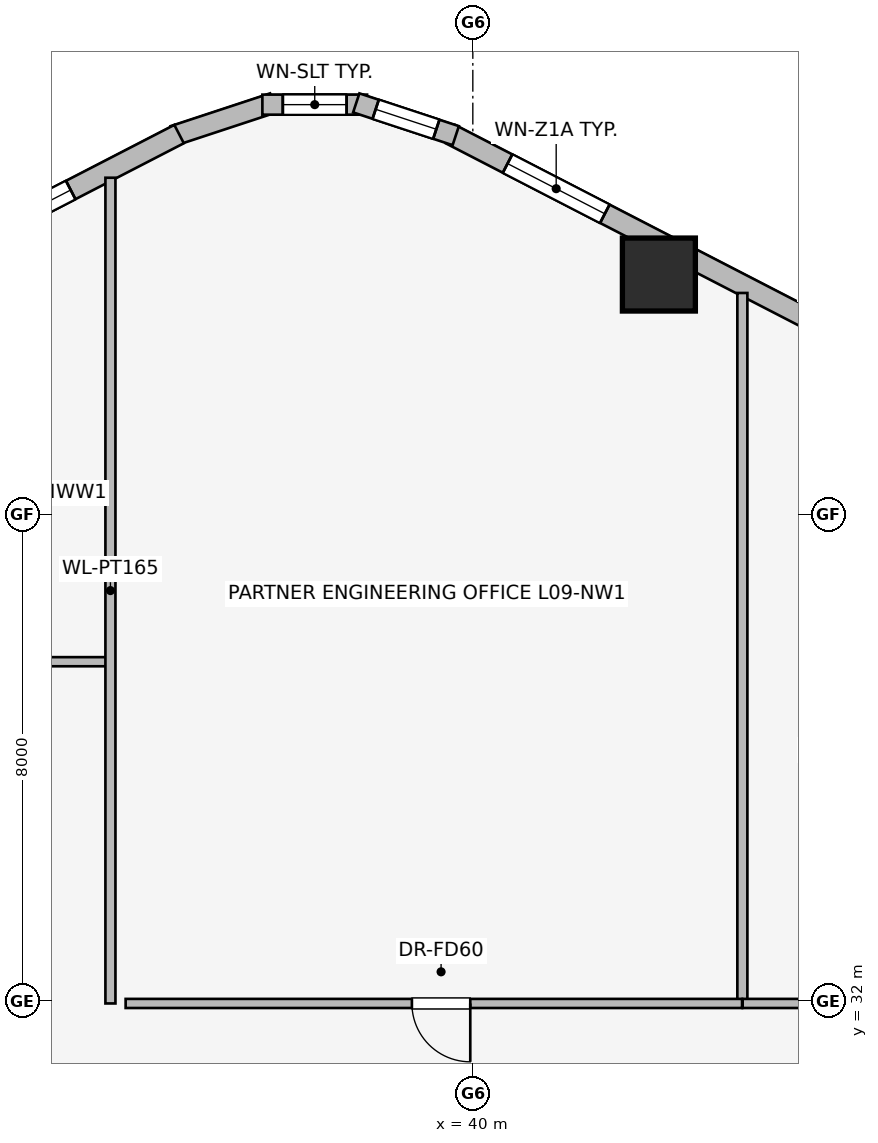
"""IFC4 building model, lengths in metres.
Left out: names, types, materials, properties, quantities, classifications, styles, units other than length and angle.
Written with IfcOpenShell. Run it as: python <this file> out.ifc"""

import sys

from ifc_helpers import new_model, si_unit, direction, frame, frame_2d, origin, origin_2d, place, context, subcontext, project, spatial, rectangle, extrude, element, fill, save


model = new_model("IFC4")
c1 = context("Model", 3, precision=1e-05, world=origin(), true_north=direction((0.0, 1.0)))
c2 = subcontext(c1, "Body", "Model", "MODEL_VIEW")
j1 = project(units=[si_unit("LENGTHUNIT", "METRE"), si_unit("PLANEANGLEUNIT", "RADIAN")], contexts=[c1])
p1 = place(None, origin())
s1 = spatial("IfcSite", under=j1, at=p1, CompositionType="ELEMENT")
p2 = place(p1, origin())
s2 = spatial("IfcBuilding", under=s1, at=p2, CompositionType="ELEMENT")
p3 = place(p2, frame((0.0, 0.0, 37.95)))
s3 = spatial("IfcBuildingStorey", under=s2, at=p3, CompositionType="ELEMENT", Elevation=37.95)
p4 = place(p3, frame((43.06, 43.947, 0.0), z_axis=(0.0, 0.0, 1.0), x_axis=(1.0, 0.0, 0.0)))
e1 = element("IfcColumn", 1, at=p4, inside=s3, PredefinedType="COLUMN", context=c2, shape_type="SweptSolid", body=[
    extrude(rectangle(XDim=1.2, YDim=1.2, at=origin_2d()), origin(), (0.0, 0.0, 1.0), 3.65),
])
p5 = place(p3, frame((39.631, 46.257, 0.0), z_axis=(0.0, 0.0, 1.0), x_axis=(0.888634413993, -0.458616264721, 0.0)))
e2 = element("IfcWall", 2, at=p5, inside=s3, PredefinedType="STANDARD", context=c2, shape_type="SweptSolid", body=[
    extrude(rectangle(XDim=20.531, YDim=0.34, at=frame_2d((10.266, 0.0))), origin(), (0.0, 0.0, 1.0), 2.684),
])
p6 = place(p5, frame((9.716, 0.0, 0.0)))
e3 = element("IfcOpeningElement", 3, at=p6, cuts=e2, PredefinedType="OPENING", context=c2, shape_type="SweptSolid", body=[
    extrude(rectangle(XDim=1.1, YDim=2.04, at=frame_2d((0.55, 1.02))), frame((0.0, 0.18, 0.0), z_axis=(0.0, -1.0, 0.0), x_axis=(1.0, 0.0, 0.0)), (0.0, 0.0, 1.0), 0.36),
])
p7 = place(p5, frame((1.058, 0.0, 0.75)))
e4 = element("IfcOpeningElement", 4, at=p7, cuts=e2, PredefinedType="OPENING", context=c2, shape_type="SweptSolid", body=[
    extrude(rectangle(XDim=1.8, YDim=1.5, at=frame_2d((0.9, 0.75))), frame((0.0, 0.18, 0.0), z_axis=(0.0, -1.0, 0.0), x_axis=(1.0, 0.0, 0.0)), (0.0, 0.0, 1.0), 0.36),
])
p8 = place(p5, frame((6.862, 0.0, 0.75)))
e5 = element("IfcOpeningElement", 5, at=p8, cuts=e2, PredefinedType="OPENING", context=c2, shape_type="SweptSolid", body=[
    extrude(rectangle(XDim=1.5, YDim=1.5, at=frame_2d((0.75, 0.75))), frame((0.0, 0.18, 0.0), z_axis=(0.0, -1.0, 0.0), x_axis=(1.0, 0.0, 0.0)), (0.0, 0.0, 1.0), 0.36),
])
p9 = place(p5, frame((11.373, 0.0, 0.75)))
e6 = element("IfcOpeningElement", 6, at=p9, cuts=e2, PredefinedType="OPENING", context=c2, shape_type="SweptSolid", body=[
    extrude(rectangle(XDim=1.8, YDim=1.5, at=frame_2d((0.9, 0.75))), frame((0.0, 0.18, 0.0), z_axis=(0.0, -1.0, 0.0), x_axis=(1.0, 0.0, 0.0)), (0.0, 0.0, 1.0), 0.36),
])
p10 = place(p5, frame((13.648, 0.0, 0.75)))
e7 = element("IfcOpeningElement", 7, at=p10, cuts=e2, PredefinedType="OPENING", context=c2, shape_type="SweptSolid", body=[
    extrude(rectangle(XDim=1.8, YDim=1.5, at=frame_2d((0.9, 0.75))), frame((0.0, 0.18, 0.0), z_axis=(0.0, -1.0, 0.0), x_axis=(1.0, 0.0, 0.0)), (0.0, 0.0, 1.0), 0.36),
])
p11 = place(p5, frame((17.823, 0.0, 0.75)))
e8 = element("IfcOpeningElement", 8, at=p11, cuts=e2, PredefinedType="OPENING", context=c2, shape_type="SweptSolid", body=[
    extrude(rectangle(XDim=1.5, YDim=1.5, at=frame_2d((0.75, 0.75))), frame((0.0, 0.18, 0.0), z_axis=(0.0, -1.0, 0.0), x_axis=(1.0, 0.0, 0.0)), (0.0, 0.0, 1.0), 0.36),
])
p12 = place(p3, frame((35.081, 46.231, 0.0), z_axis=(0.0, 0.0, 1.0), x_axis=(0.94976901097, 0.312951794691, 0.0)))
e9 = element("IfcWall", 9, at=p12, inside=s3, PredefinedType="STANDARD", context=c2, shape_type="SweptSolid", body=[
    extrude(rectangle(XDim=1.722, YDim=0.33, at=frame_2d((0.861, 0.0))), origin(), (0.0, 0.0, 1.0), 3.39),
])
p13 = place(p3, frame((36.539, 46.741, 0.0), z_axis=(0.0, 0.0, 1.0), x_axis=(1.0, 0.0, 0.0)))
e10 = element("IfcWall", 10, at=p13, inside=s3, PredefinedType="STANDARD", context=c2, shape_type="SweptSolid", body=[
    extrude(rectangle(XDim=1.722, YDim=0.33, at=frame_2d((0.861, 0.0))), origin(), (0.0, 0.0, 1.0), 3.39),
])
p14 = place(p13, frame((0.336, 0.0, 0.75)))
e11 = element("IfcOpeningElement", 11, at=p14, cuts=e10, PredefinedType="OPENING", context=c2, shape_type="SweptSolid", body=[
    extrude(rectangle(XDim=1.05, YDim=1.4, at=frame_2d((0.525, 0.7))), frame((0.0, 0.175, 0.0), z_axis=(0.0, -1.0, 0.0), x_axis=(1.0, 0.0, 0.0)), (0.0, 0.0, 1.0), 0.35),
])
p15 = place(p3, frame((38.083, 46.77, 0.0), z_axis=(0.0, 0.0, 1.0), x_axis=(0.94976901097, -0.312951794691, 0.0)))
e12 = element("IfcWall", 12, at=p15, inside=s3, PredefinedType="STANDARD", context=c2, shape_type="SweptSolid", body=[
    extrude(rectangle(XDim=1.722, YDim=0.33, at=frame_2d((0.861, 0.0))), origin(), (0.0, 0.0, 1.0), 3.39),
])
p16 = place(p15, frame((0.336, 0.0, 0.75)))
e13 = element("IfcOpeningElement", 13, at=p16, cuts=e12, PredefinedType="OPENING", context=c2, shape_type="SweptSolid", body=[
    extrude(rectangle(XDim=1.05, YDim=1.4, at=frame_2d((0.525, 0.7))), frame((0.0, 0.175, 0.0), z_axis=(0.0, -1.0, 0.0), x_axis=(1.0, 0.0, 0.0)), (0.0, 0.0, 1.0), 0.35),
])
p17 = place(p3, frame((16.924, 36.841, 0.0), z_axis=(0.0, 0.0, 1.0), x_axis=(0.888634413993, 0.458616264721, 0.0)))
e14 = element("IfcWall", 14, at=p17, inside=s3, PredefinedType="STANDARD", context=c2, shape_type="SweptSolid", body=[
    extrude(rectangle(XDim=20.531, YDim=0.34, at=frame_2d((10.266, 0.0))), origin(), (0.0, 0.0, 1.0), 2.684),
])
p18 = place(p17, frame((2.161, 0.0, 0.75)))
e15 = element("IfcOpeningElement", 15, at=p18, cuts=e14, PredefinedType="OPENING", context=c2, shape_type="SweptSolid", body=[
    extrude(rectangle(XDim=1.05, YDim=1.4, at=frame_2d((0.525, 0.7))), frame((0.0, 0.18, 0.0), z_axis=(0.0, -1.0, 0.0), x_axis=(1.0, 0.0, 0.0)), (0.0, 0.0, 1.0), 0.36),
])
p19 = place(p17, frame((5.903, 0.0, 0.75)))
e16 = element("IfcOpeningElement", 16, at=p19, cuts=e14, PredefinedType="OPENING", context=c2, shape_type="SweptSolid", body=[
    extrude(rectangle(XDim=1.5, YDim=1.5, at=frame_2d((0.75, 0.75))), frame((0.0, 0.18, 0.0), z_axis=(0.0, -1.0, 0.0), x_axis=(1.0, 0.0, 0.0)), (0.0, 0.0, 1.0), 0.36),
])
p20 = place(p17, frame((9.516, 0.0, 0.75)))
e17 = element("IfcOpeningElement", 17, at=p20, cuts=e14, PredefinedType="OPENING", context=c2, shape_type="SweptSolid", body=[
    extrude(rectangle(XDim=1.5, YDim=1.5, at=frame_2d((0.75, 0.75))), frame((0.0, 0.18, 0.0), z_axis=(0.0, -1.0, 0.0), x_axis=(1.0, 0.0, 0.0)), (0.0, 0.0, 1.0), 0.36),
])
p21 = place(p17, frame((13.129, 0.0, 0.75)))
e18 = element("IfcOpeningElement", 18, at=p21, cuts=e14, PredefinedType="OPENING", context=c2, shape_type="SweptSolid", body=[
    extrude(rectangle(XDim=1.5, YDim=1.5, at=frame_2d((0.75, 0.75))), frame((0.0, 0.18, 0.0), z_axis=(0.0, -1.0, 0.0), x_axis=(1.0, 0.0, 0.0)), (0.0, 0.0, 1.0), 0.36),
])
p22 = place(p17, frame((17.476, 0.0, 0.75)))
e19 = element("IfcOpeningElement", 19, at=p22, cuts=e14, PredefinedType="OPENING", context=c2, shape_type="SweptSolid", body=[
    extrude(rectangle(XDim=1.05, YDim=1.4, at=frame_2d((0.525, 0.7))), frame((0.0, 0.18, 0.0), z_axis=(0.0, -1.0, 0.0), x_axis=(1.0, 0.0, 0.0)), (0.0, 0.0, 1.0), 0.36),
])
p23 = place(p3, frame((34.0, 37.58, 0.0), z_axis=(0.0, 0.0, 1.0), x_axis=(-1.0, 0.0, 0.0)))
e20 = element("IfcWall", 20, at=p23, inside=s3, PredefinedType="PARTITIONING", context=c2, shape_type="SweptSolid", body=[
    extrude(rectangle(XDim=15.6, YDim=0.15, at=frame_2d((7.8, 0.0))), origin(), (0.0, 0.0, 1.0), 3.39),
])
p24 = place(p23, frame((5.195, 0.0, 0.0)))
e21 = element("IfcOpeningElement", 21, at=p24, cuts=e20, PredefinedType="OPENING", context=c2, shape_type="SweptSolid", body=[
    extrude(rectangle(XDim=0.96, YDim=2.0, at=frame_2d((0.48, 1.0))), frame((0.0, 0.085, 0.0), z_axis=(0.0, -1.0, 0.0), x_axis=(1.0, 0.0, 0.0)), (0.0, 0.0, 1.0), 0.17),
])
p25 = place(p3, frame((34.04, 31.96, 0.0), z_axis=(0.0, 0.0, 1.0), x_axis=(0.0, 1.0, 0.0)))
e22 = element("IfcWall", 22, at=p25, inside=s3, PredefinedType="PARTITIONING", context=c2, shape_type="SweptSolid", body=[
    extrude(rectangle(XDim=13.579, YDim=0.165, at=frame_2d((6.79, 0.0))), origin(), (0.0, 0.0, 1.0), 3.39),
])
p26 = place(p3, frame((44.433, 31.97, 0.0), z_axis=(0.0, 0.0, 1.0), x_axis=(0.0, 1.0, 0.0)))
e23 = element("IfcWall", 23, at=p26, inside=s3, PredefinedType="PARTITIONING", context=c2, shape_type="SweptSolid", body=[
    extrude(rectangle(XDim=11.674, YDim=0.165, at=frame_2d((5.837, 0.0))), origin(), (0.0, 0.0, 1.0), 3.39),
])
p27 = place(p3, frame((44.428, 31.96, 0.0), z_axis=(0.0, 0.0, 1.0), x_axis=(-1.0, 0.0, 0.0)))
e24 = element("IfcWall", 24, at=p27, inside=s3, PredefinedType="PARTITIONING", context=c2, shape_type="SweptSolid", body=[
    extrude(rectangle(XDim=10.138, YDim=0.15, at=frame_2d((5.069, 0.0))), origin(), (0.0, 0.0, 1.0), 3.39),
])
p28 = place(p27, frame((4.47, 0.0, 0.0)))
e25 = element("IfcOpeningElement", 25, at=p28, cuts=e24, PredefinedType="OPENING", context=c2, shape_type="SweptSolid", body=[
    extrude(rectangle(XDim=0.96, YDim=2.0, at=frame_2d((0.48, 1.0))), frame((0.0, 0.085, 0.0), z_axis=(0.0, -1.0, 0.0), x_axis=(1.0, 0.0, 0.0)), (0.0, 0.0, 1.0), 0.17),
])
p29 = place(p3, frame((60.032, 31.96, 0.0), z_axis=(0.0, 0.0, 1.0), x_axis=(-1.0, 0.0, 0.0)))
e26 = element("IfcWall", 26, at=p29, inside=s3, PredefinedType="PARTITIONING", context=c2, shape_type="SweptSolid", body=[
    extrude(rectangle(XDim=15.594, YDim=0.15, at=frame_2d((7.797, 0.0))), origin(), (0.0, 0.0, 1.0), 3.39),
])
p30 = place(p29, frame((7.437, 0.0, 0.0)))
e27 = element("IfcOpeningElement", 27, at=p30, cuts=e26, PredefinedType="OPENING", context=c2, shape_type="SweptSolid", body=[
    extrude(rectangle(XDim=0.96, YDim=2.0, at=frame_2d((0.48, 1.0))), frame((0.0, 0.085, 0.0), z_axis=(0.0, -1.0, 0.0), x_axis=(1.0, 0.0, 0.0)), (0.0, 0.0, 1.0), 0.17),
])
p31 = place(p7, origin())
e28 = element("IfcWindow", 28, at=p31, inside=s3, PartitioningType="SINGLE_PANEL", PredefinedType="WINDOW", context=c2, shape_type="SweptSolid", body=[
    extrude(rectangle(XDim=1.8, YDim=1.5, at=frame_2d((0.9, 0.75))), frame((0.0, 0.03, 0.0), z_axis=(0.0, -1.0, 0.0), x_axis=(1.0, 0.0, 0.0)), (0.0, 0.0, 1.0), 0.06),
])
fill(e4, e28)
p32 = place(p14, origin())
e29 = element("IfcWindow", 29, at=p32, inside=s3, PartitioningType="SINGLE_PANEL", PredefinedType="WINDOW", context=c2, shape_type="SweptSolid", body=[
    extrude(rectangle(XDim=1.05, YDim=1.4, at=frame_2d((0.525, 0.7))), frame((0.0, 0.03, 0.0), z_axis=(0.0, -1.0, 0.0), x_axis=(1.0, 0.0, 0.0)), (0.0, 0.0, 1.0), 0.06),
])
fill(e11, e29)
p33 = place(p16, origin())
e30 = element("IfcWindow", 30, at=p33, inside=s3, PartitioningType="SINGLE_PANEL", PredefinedType="WINDOW", context=c2, shape_type="SweptSolid", body=[
    extrude(rectangle(XDim=1.05, YDim=1.4, at=frame_2d((0.525, 0.7))), frame((0.0, 0.03, 0.0), z_axis=(0.0, -1.0, 0.0), x_axis=(1.0, 0.0, 0.0)), (0.0, 0.0, 1.0), 0.06),
])
fill(e13, e30)
p34 = place(p22, origin())
e31 = element("IfcWindow", 31, at=p34, inside=s3, PartitioningType="SINGLE_PANEL", PredefinedType="WINDOW", context=c2, shape_type="SweptSolid", body=[
    extrude(rectangle(XDim=1.05, YDim=1.4, at=frame_2d((0.525, 0.7))), frame((0.0, 0.03, 0.0), z_axis=(0.0, -1.0, 0.0), x_axis=(1.0, 0.0, 0.0)), (0.0, 0.0, 1.0), 0.06),
])
fill(e19, e31)
p35 = place(p28, origin())
e32 = element("IfcDoor", 32, at=p35, inside=s3, OperationType="SINGLE_SWING_LEFT", PredefinedType="DOOR", context=c2, shape_type="SweptSolid", body=[
    extrude(rectangle(XDim=0.96, YDim=2.0, at=frame_2d((0.48, 1.0))), frame((0.0, 0.025, 0.0), z_axis=(0.0, -1.0, 0.0), x_axis=(1.0, 0.0, 0.0)), (0.0, 0.0, 1.0), 0.05),
])
fill(e25, e32)
save(model, sys.argv[1])
